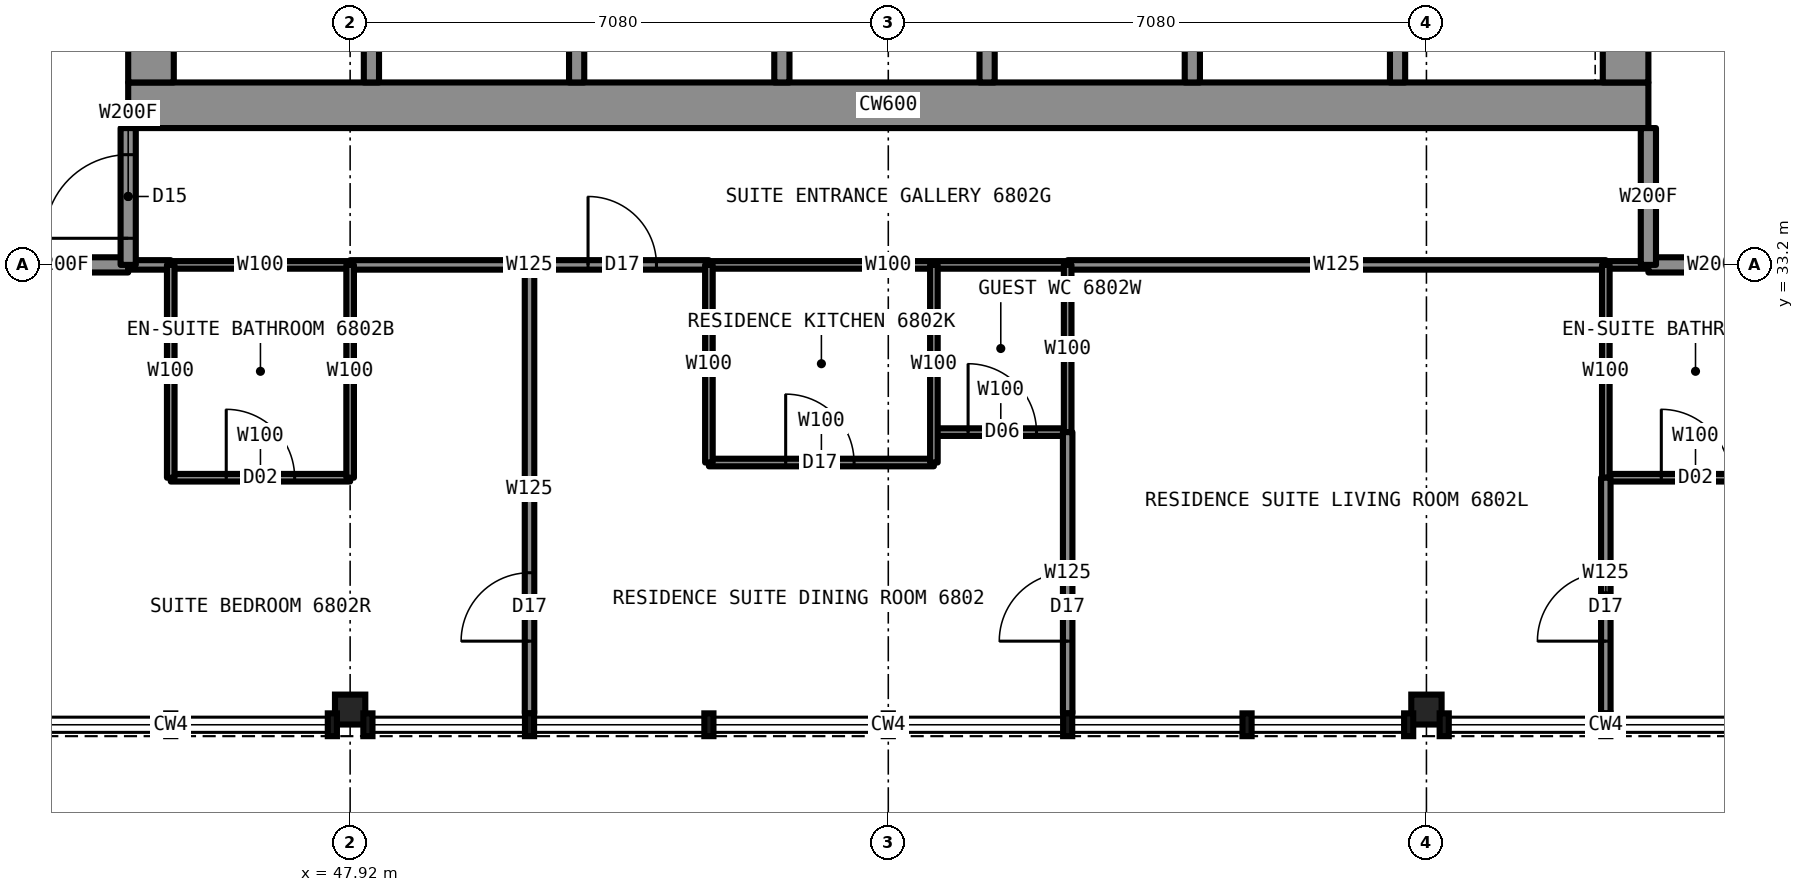
"""IFC4 building model, lengths in metres.
Left out: names, types, materials, properties, quantities, classifications, styles, units other than length and angle.
Written with IfcOpenShell. Run it as: python <this file> out.ifc"""

import sys

from ifc_helpers import new_model, si_unit, direction, frame, frame_2d, origin, origin_2d, place, context, subcontext, project, spatial, rectangle, i_section, extrude, element, fill, save


model = new_model("IFC4")
c1 = context("Model", 3, precision=1e-05, world=origin(), true_north=direction((0.0, 1.0)))
c2 = subcontext(c1, "Body", "Model", "MODEL_VIEW")
j1 = project(units=[si_unit("LENGTHUNIT", "METRE"), si_unit("PLANEANGLEUNIT", "RADIAN")], contexts=[c1])
p1 = place(None, origin())
s1 = spatial("IfcSite", under=j1, at=p1, CompositionType="ELEMENT")
p2 = place(p1, origin())
s2 = spatial("IfcBuilding", under=s1, at=p2, CompositionType="ELEMENT")
p3 = place(p2, frame((0.0, 0.0, 247.7)))
s3 = spatial("IfcBuildingStorey", under=s2, at=p3, CompositionType="ELEMENT", Elevation=247.7)
for number, where, z_axis, x_axis in (
    (1, (47.92, 27.35, 0.0), (0.0, 0.0, 1.0), (1.0, 0.0, 0.0)),
    (2, (62.08, 27.35, 0.0), (0.0, 0.0, 1.0), (1.0, 0.0, 0.0)),
):
    element("IfcColumn", number, at=place(p3, frame(where, z_axis=z_axis, x_axis=x_axis)), inside=s3, PredefinedType="COLUMN", context=c2, shape_type="SweptSolid", body=[
        extrude(i_section(OverallWidth=0.399, OverallDepth=0.394, WebThickness=0.023, FlangeThickness=0.037, at=origin_2d()), origin(), (0.0, 0.0, 1.0), 3.5),
    ])
p4 = place(p3, frame((45.0, 35.3, 0.0), z_axis=(0.0, 0.0, 1.0), x_axis=(1.0, 0.0, 0.0)))
e3 = element("IfcWall", 3, at=p4, inside=s3, PredefinedType="SHEAR", context=c2, shape_type="SweptSolid", body=[
    extrude(rectangle(XDim=20.0, YDim=0.6, at=frame_2d((10.0, 0.0))), origin(), (0.0, 0.0, 1.0), 3.5),
])
p5 = place(p3, frame((64.7, 35.6, 0.0), z_axis=(0.0, 0.0, 1.0), x_axis=(0.0, 1.0, 0.0)))
e4 = element("IfcWall", 4, at=p5, inside=s3, PredefinedType="SHEAR", context=c2, shape_type="SweptSolid", body=[
    extrude(rectangle(XDim=18.8, YDim=0.6, at=frame_2d((9.4, 0.0))), origin(), (0.0, 0.0, 1.0), 3.5),
])
p6 = place(p5, frame((13.4, 0.0, 0.0)))
e5 = element("IfcOpeningElement", 5, at=p6, cuts=e4, PredefinedType="OPENING", context=c2, shape_type="SweptSolid", body=[
    extrude(rectangle(XDim=1.8, YDim=2.2, at=frame_2d((0.9, 1.1))), frame((0.0, 0.31, 0.0), z_axis=(0.0, -1.0, 0.0), x_axis=(1.0, 0.0, 0.0)), (0.0, 0.0, 1.0), 0.62),
])
p7 = place(p5, frame((3.6, 0.0, 0.0)))
e6 = element("IfcOpeningElement", 6, at=p7, cuts=e4, PredefinedType="OPENING", context=c2, shape_type="SweptSolid", body=[
    extrude(rectangle(XDim=1.8, YDim=2.2, at=frame_2d((0.9, 1.1))), frame((0.0, 0.31, 0.0), z_axis=(0.0, -1.0, 0.0), x_axis=(1.0, 0.0, 0.0)), (0.0, 0.0, 1.0), 0.62),
])
p8 = place(p3, frame((45.3, 35.6, 0.0), z_axis=(0.0, 0.0, 1.0), x_axis=(0.0, 1.0, 0.0)))
e7 = element("IfcWall", 7, at=p8, inside=s3, PredefinedType="SHEAR", context=c2, shape_type="SweptSolid", body=[
    extrude(rectangle(XDim=18.8, YDim=0.6, at=frame_2d((9.4, 0.0))), origin(), (0.0, 0.0, 1.0), 3.5),
])
p9 = place(p8, frame((13.4, 0.0, 0.0)))
e8 = element("IfcOpeningElement", 8, at=p9, cuts=e7, PredefinedType="OPENING", context=c2, shape_type="SweptSolid", body=[
    extrude(rectangle(XDim=1.8, YDim=2.2, at=frame_2d((0.9, 1.1))), frame((0.0, 0.31, 0.0), z_axis=(0.0, -1.0, 0.0), x_axis=(1.0, 0.0, 0.0)), (0.0, 0.0, 1.0), 0.62),
])
p10 = place(p8, frame((3.6, 0.0, 0.0)))
e9 = element("IfcOpeningElement", 9, at=p10, cuts=e7, PredefinedType="OPENING", context=c2, shape_type="SweptSolid", body=[
    extrude(rectangle(XDim=1.8, YDim=2.2, at=frame_2d((0.9, 1.1))), frame((0.0, 0.31, 0.0), z_axis=(0.0, -1.0, 0.0), x_axis=(1.0, 0.0, 0.0)), (0.0, 0.0, 1.0), 0.62),
])
p11 = place(p8, frame((6.4, 0.0, 0.0)))
e10 = element("IfcOpeningElement", 10, at=p11, cuts=e7, PredefinedType="OPENING", context=c2, shape_type="SweptSolid", body=[
    extrude(rectangle(XDim=1.2, YDim=2.2, at=frame_2d((0.6, 1.1))), frame((0.0, 0.31, 0.0), z_axis=(0.0, -1.0, 0.0), x_axis=(1.0, 0.0, 0.0)), (0.0, 0.0, 1.0), 0.62),
])
p12 = place(p3, frame((45.56, 33.2, 0.0), z_axis=(0.0, 0.0, 1.0), x_axis=(1.0, 0.0, 0.0)))
e11 = element("IfcWall", 11, at=p12, inside=s3, PredefinedType="PARTITIONING", context=c2, shape_type="SweptSolid", body=[
    extrude(rectangle(XDim=2.36, YDim=0.1, at=frame_2d((1.18, 0.0))), origin(), (0.0, 0.0, 1.0), 3.33),
])
p13 = place(p3, frame((52.64, 33.2, 0.0), z_axis=(0.0, 0.0, 1.0), x_axis=(1.0, 0.0, 0.0)))
e12 = element("IfcWall", 12, at=p13, inside=s3, PredefinedType="PARTITIONING", context=c2, shape_type="SweptSolid", body=[
    extrude(rectangle(XDim=4.72, YDim=0.1, at=frame_2d((2.36, 0.0))), origin(), (0.0, 0.0, 1.0), 3.33),
])
p14 = place(p3, frame((64.44, 33.2, 0.0), z_axis=(0.0, 0.0, 1.0), x_axis=(1.0, 0.0, 0.0)))
e13 = element("IfcWall", 13, at=p14, inside=s3, PredefinedType="PARTITIONING", context=c2, shape_type="SweptSolid", body=[
    extrude(rectangle(XDim=0.56, YDim=0.1, at=frame_2d((0.28, 0.0))), origin(), (0.0, 0.0, 1.0), 3.33),
])
p15 = place(p3, frame((43.2, 33.2, 0.0), z_axis=(0.0, 0.0, 1.0), x_axis=(1.0, 0.0, 0.0)))
e14 = element("IfcWall", 14, at=p15, inside=s3, PredefinedType="PARTITIONING", context=c2, shape_type="SweptSolid", body=[
    extrude(rectangle(XDim=1.8, YDim=0.2, at=frame_2d((0.9, 0.0))), origin(), (0.0, 0.0, 1.0), 3.33),
])
p16 = place(p3, frame((65.0, 33.2, 0.0), z_axis=(0.0, 0.0, 1.0), x_axis=(1.0, 0.0, 0.0)))
e15 = element("IfcWall", 15, at=p16, inside=s3, PredefinedType="PARTITIONING", context=c2, shape_type="SweptSolid", body=[
    extrude(rectangle(XDim=1.78, YDim=0.2, at=frame_2d((0.89, 0.0))), origin(), (0.0, 0.0, 1.0), 3.33),
])
p17 = place(p3, frame((45.0, 33.2, 0.0), z_axis=(0.0, 0.0, 1.0), x_axis=(1.0, 0.0, 0.0)))
e16 = element("IfcWall", 16, at=p17, inside=s3, PredefinedType="PARTITIONING", context=c2, shape_type="SweptSolid", body=[
    extrude(rectangle(XDim=0.56, YDim=0.125, at=frame_2d((0.28, 0.0))), origin(), (0.0, 0.0, 1.0), 3.33),
])
p18 = place(p3, frame((47.92, 33.2, 0.0), z_axis=(0.0, 0.0, 1.0), x_axis=(1.0, 0.0, 0.0)))
e17 = element("IfcWall", 17, at=p18, inside=s3, PredefinedType="PARTITIONING", context=c2, shape_type="SweptSolid", body=[
    extrude(rectangle(XDim=4.72, YDim=0.125, at=frame_2d((2.36, 0.0))), origin(), (0.0, 0.0, 1.0), 3.33),
])
p19 = place(p18, frame((3.13, 0.0, 0.0)))
e18 = element("IfcOpeningElement", 18, at=p19, cuts=e17, PredefinedType="OPENING", context=c2, shape_type="SweptSolid", body=[
    extrude(rectangle(XDim=0.9, YDim=2.2, at=frame_2d((0.45, 1.1))), frame((0.0, 0.073, 0.0), z_axis=(0.0, -1.0, 0.0), x_axis=(1.0, 0.0, 0.0)), (0.0, 0.0, 1.0), 0.145),
])
p20 = place(p3, frame((57.36, 33.2, 0.0), z_axis=(0.0, 0.0, 1.0), x_axis=(1.0, 0.0, 0.0)))
e19 = element("IfcWall", 19, at=p20, inside=s3, PredefinedType="PARTITIONING", context=c2, shape_type="SweptSolid", body=[
    extrude(rectangle(XDim=7.08, YDim=0.125, at=frame_2d((3.54, 0.0))), origin(), (0.0, 0.0, 1.0), 3.33),
])
p21 = place(p3, frame((55.6, 31.0, 0.0), z_axis=(0.0, 0.0, 1.0), x_axis=(1.0, 0.0, 0.0)))
e20 = element("IfcWall", 20, at=p21, inside=s3, PredefinedType="PARTITIONING", context=c2, shape_type="SweptSolid", body=[
    extrude(rectangle(XDim=1.76, YDim=0.1, at=frame_2d((0.88, 0.0))), origin(), (0.0, 0.0, 1.0), 3.33),
])
p22 = place(p21, frame((0.45, 0.0, 0.0)))
e21 = element("IfcOpeningElement", 21, at=p22, cuts=e20, PredefinedType="OPENING", context=c2, shape_type="SweptSolid", body=[
    extrude(rectangle(XDim=0.9, YDim=2.1, at=frame_2d((0.45, 1.05))), frame((0.0, 0.06, 0.0), z_axis=(0.0, -1.0, 0.0), x_axis=(1.0, 0.0, 0.0)), (0.0, 0.0, 1.0), 0.12),
])
p23 = place(p3, frame((52.64, 30.6, 0.0), z_axis=(0.0, 0.0, 1.0), x_axis=(1.0, 0.0, 0.0)))
e22 = element("IfcWall", 22, at=p23, inside=s3, PredefinedType="PARTITIONING", context=c2, shape_type="SweptSolid", body=[
    extrude(rectangle(XDim=2.96, YDim=0.1, at=frame_2d((1.48, 0.0))), origin(), (0.0, 0.0, 1.0), 3.33),
])
p24 = place(p23, frame((1.01, 0.0, 0.0)))
e23 = element("IfcOpeningElement", 23, at=p24, cuts=e22, PredefinedType="OPENING", context=c2, shape_type="SweptSolid", body=[
    extrude(rectangle(XDim=0.9, YDim=2.2, at=frame_2d((0.45, 1.1))), frame((0.0, 0.06, 0.0), z_axis=(0.0, -1.0, 0.0), x_axis=(1.0, 0.0, 0.0)), (0.0, 0.0, 1.0), 0.12),
])
p25 = place(p3, frame((45.56, 30.4, 0.0), z_axis=(0.0, 0.0, 1.0), x_axis=(1.0, 0.0, 0.0)))
e24 = element("IfcWall", 24, at=p25, inside=s3, PredefinedType="PARTITIONING", context=c2, shape_type="SweptSolid", body=[
    extrude(rectangle(XDim=2.36, YDim=0.1, at=frame_2d((1.18, 0.0))), origin(), (0.0, 0.0, 1.0), 3.33),
])
p26 = place(p25, frame((0.73, 0.0, 0.0)))
e25 = element("IfcOpeningElement", 25, at=p26, cuts=e24, PredefinedType="OPENING", context=c2, shape_type="SweptSolid", body=[
    extrude(rectangle(XDim=0.9, YDim=2.1, at=frame_2d((0.45, 1.05))), frame((0.0, 0.06, 0.0), z_axis=(0.0, -1.0, 0.0), x_axis=(1.0, 0.0, 0.0)), (0.0, 0.0, 1.0), 0.12),
])
p27 = place(p3, frame((64.44, 30.4, 0.0), z_axis=(0.0, 0.0, 1.0), x_axis=(1.0, 0.0, 0.0)))
e26 = element("IfcWall", 26, at=p27, inside=s3, PredefinedType="PARTITIONING", context=c2, shape_type="SweptSolid", body=[
    extrude(rectangle(XDim=2.36, YDim=0.1, at=frame_2d((1.18, 0.0))), origin(), (0.0, 0.0, 1.0), 3.33),
])
p28 = place(p27, frame((0.73, 0.0, 0.0)))
e27 = element("IfcOpeningElement", 27, at=p28, cuts=e26, PredefinedType="OPENING", context=c2, shape_type="SweptSolid", body=[
    extrude(rectangle(XDim=0.9, YDim=2.1, at=frame_2d((0.45, 1.05))), frame((0.0, 0.06, 0.0), z_axis=(0.0, -1.0, 0.0), x_axis=(1.0, 0.0, 0.0)), (0.0, 0.0, 1.0), 0.12),
])
p29 = place(p3, frame((45.0, 33.2, 0.0), z_axis=(0.0, 0.0, 1.0), x_axis=(0.0, 1.0, 0.0)))
e28 = element("IfcWall", 28, at=p29, inside=s3, PredefinedType="PARTITIONING", context=c2, shape_type="SweptSolid", body=[
    extrude(rectangle(XDim=1.8, YDim=0.2, at=frame_2d((0.9, 0.0))), origin(), (0.0, 0.0, 1.0), 3.33),
])
p30 = place(p29, frame((0.35, 0.0, 0.0)))
e29 = element("IfcOpeningElement", 29, at=p30, cuts=e28, PredefinedType="OPENING", context=c2, shape_type="SweptSolid", body=[
    extrude(rectangle(XDim=1.1, YDim=2.2, at=frame_2d((0.55, 1.1))), frame((0.0, 0.11, 0.0), z_axis=(0.0, -1.0, 0.0), x_axis=(1.0, 0.0, 0.0)), (0.0, 0.0, 1.0), 0.22),
])
p31 = place(p3, frame((52.64, 30.6, 0.0), z_axis=(0.0, 0.0, 1.0), x_axis=(0.0, 1.0, 0.0)))
e30 = element("IfcWall", 30, at=p31, inside=s3, PredefinedType="PARTITIONING", context=c2, shape_type="SweptSolid", body=[
    extrude(rectangle(XDim=2.6, YDim=0.1, at=frame_2d((1.3, 0.0))), origin(), (0.0, 0.0, 1.0), 3.33),
])
p32 = place(p3, frame((50.28, 27.3, 0.0), z_axis=(0.0, 0.0, 1.0), x_axis=(0.0, 1.0, 0.0)))
e31 = element("IfcWall", 31, at=p32, inside=s3, PredefinedType="PARTITIONING", context=c2, shape_type="SweptSolid", body=[
    extrude(rectangle(XDim=5.9, YDim=0.125, at=frame_2d((2.95, 0.0))), origin(), (0.0, 0.0, 1.0), 3.33),
])
p33 = place(p32, frame((0.95, 0.0, 0.0)))
e32 = element("IfcOpeningElement", 32, at=p33, cuts=e31, PredefinedType="OPENING", context=c2, shape_type="SweptSolid", body=[
    extrude(rectangle(XDim=0.9, YDim=2.2, at=frame_2d((0.45, 1.1))), frame((0.0, 0.073, 0.0), z_axis=(0.0, -1.0, 0.0), x_axis=(1.0, 0.0, 0.0)), (0.0, 0.0, 1.0), 0.145),
])
p34 = place(p3, frame((47.92, 30.4, 0.0), z_axis=(0.0, 0.0, 1.0), x_axis=(0.0, 1.0, 0.0)))
e33 = element("IfcWall", 33, at=p34, inside=s3, PredefinedType="PARTITIONING", context=c2, shape_type="SweptSolid", body=[
    extrude(rectangle(XDim=2.8, YDim=0.1, at=frame_2d((1.4, 0.0))), origin(), (0.0, 0.0, 1.0), 2.573),
])
p35 = place(p3, frame((45.56, 30.4, 0.0), z_axis=(0.0, 0.0, 1.0), x_axis=(0.0, 1.0, 0.0)))
e34 = element("IfcWall", 34, at=p35, inside=s3, PredefinedType="PARTITIONING", context=c2, shape_type="SweptSolid", body=[
    extrude(rectangle(XDim=2.8, YDim=0.1, at=frame_2d((1.4, 0.0))), origin(), (0.0, 0.0, 1.0), 3.33),
])
p36 = place(p3, frame((55.6, 30.6, 0.0), z_axis=(0.0, 0.0, 1.0), x_axis=(0.0, 1.0, 0.0)))
e35 = element("IfcWall", 35, at=p36, inside=s3, PredefinedType="PARTITIONING", context=c2, shape_type="SweptSolid", body=[
    extrude(rectangle(XDim=2.6, YDim=0.1, at=frame_2d((1.3, 0.0))), origin(), (0.0, 0.0, 1.0), 3.33),
])
p37 = place(p3, frame((65.0, 33.2, 0.0), z_axis=(0.0, 0.0, 1.0), x_axis=(0.0, 1.0, 0.0)))
e36 = element("IfcWall", 36, at=p37, inside=s3, PredefinedType="PARTITIONING", context=c2, shape_type="SweptSolid", body=[
    extrude(rectangle(XDim=1.8, YDim=0.2, at=frame_2d((0.9, 0.0))), origin(), (0.0, 0.0, 1.0), 3.33),
])
p38 = place(p3, frame((57.36, 31.0, 0.0), z_axis=(0.0, 0.0, 1.0), x_axis=(0.0, 1.0, 0.0)))
e37 = element("IfcWall", 37, at=p38, inside=s3, PredefinedType="PARTITIONING", context=c2, shape_type="SweptSolid", body=[
    extrude(rectangle(XDim=2.2, YDim=0.1, at=frame_2d((1.1, 0.0))), origin(), (0.0, 0.0, 1.0), 3.33),
])
p39 = place(p3, frame((57.36, 27.3, 0.0), z_axis=(0.0, 0.0, 1.0), x_axis=(0.0, 1.0, 0.0)))
e38 = element("IfcWall", 38, at=p39, inside=s3, PredefinedType="PARTITIONING", context=c2, shape_type="SweptSolid", body=[
    extrude(rectangle(XDim=3.7, YDim=0.125, at=frame_2d((1.85, 0.0))), origin(), (0.0, 0.0, 1.0), 3.33),
])
p40 = place(p39, frame((0.95, 0.0, 0.0)))
e39 = element("IfcOpeningElement", 39, at=p40, cuts=e38, PredefinedType="OPENING", context=c2, shape_type="SweptSolid", body=[
    extrude(rectangle(XDim=0.9, YDim=2.2, at=frame_2d((0.45, 1.1))), frame((0.0, 0.073, 0.0), z_axis=(0.0, -1.0, 0.0), x_axis=(1.0, 0.0, 0.0)), (0.0, 0.0, 1.0), 0.145),
])
p41 = place(p3, frame((64.44, 30.4, 0.0), z_axis=(0.0, 0.0, 1.0), x_axis=(0.0, 1.0, 0.0)))
e40 = element("IfcWall", 40, at=p41, inside=s3, PredefinedType="PARTITIONING", context=c2, shape_type="SweptSolid", body=[
    extrude(rectangle(XDim=2.8, YDim=0.1, at=frame_2d((1.4, 0.0))), origin(), (0.0, 0.0, 1.0), 3.33),
])
p42 = place(p3, frame((64.44, 27.3, 0.0), z_axis=(0.0, 0.0, 1.0), x_axis=(0.0, 1.0, 0.0)))
e41 = element("IfcWall", 41, at=p42, inside=s3, PredefinedType="PARTITIONING", context=c2, shape_type="SweptSolid", body=[
    extrude(rectangle(XDim=3.1, YDim=0.125, at=frame_2d((1.55, 0.0))), origin(), (0.0, 0.0, 1.0), 3.33),
])
p43 = place(p42, frame((0.95, 0.0, 0.0)))
e42 = element("IfcOpeningElement", 42, at=p43, cuts=e41, PredefinedType="OPENING", context=c2, shape_type="SweptSolid", body=[
    extrude(rectangle(XDim=0.9, YDim=2.2, at=frame_2d((0.45, 1.1))), frame((0.0, 0.073, 0.0), z_axis=(0.0, -1.0, 0.0), x_axis=(1.0, 0.0, 0.0)), (0.0, 0.0, 1.0), 0.145),
])
for number, where, z_axis, x_axis in (
    (43, (48.2, 35.6, 0.0), (0.0, 0.0, 1.0), (0.0, 1.0, 0.0)),
    (44, (50.9, 35.6, 0.0), (0.0, 0.0, 1.0), (0.0, 1.0, 0.0)),
    (45, (53.6, 35.6, 0.0), (0.0, 0.0, 1.0), (0.0, 1.0, 0.0)),
    (46, (56.3, 35.6, 0.0), (0.0, 0.0, 1.0), (0.0, 1.0, 0.0)),
    (47, (59.0, 35.6, 0.0), (0.0, 0.0, 1.0), (0.0, 1.0, 0.0)),
    (48, (61.7, 35.6, 0.0), (0.0, 0.0, 1.0), (0.0, 1.0, 0.0)),
):
    element("IfcWall", number, at=place(p3, frame(where, z_axis=z_axis, x_axis=x_axis)), inside=s3, PredefinedType="PARTITIONING", context=c2, shape_type="SweptSolid", body=[
        extrude(rectangle(XDim=2.7, YDim=0.2, at=frame_2d((1.35, 0.0))), origin(), (0.0, 0.0, 1.0), 3.33),
    ])
p44 = place(p19, origin())
e49 = element("IfcDoor", 49, at=p44, inside=s3, OperationType="SINGLE_SWING_LEFT", PredefinedType="DOOR", context=c2, shape_type="SweptSolid", body=[
    extrude(rectangle(XDim=0.9, YDim=2.2, at=frame_2d((0.45, 1.1))), frame((0.0, 0.025, 0.0), z_axis=(0.0, -1.0, 0.0), x_axis=(1.0, 0.0, 0.0)), (0.0, 0.0, 1.0), 0.05),
])
fill(e18, e49)
p45 = place(p26, origin())
e50 = element("IfcDoor", 50, at=p45, inside=s3, OperationType="SINGLE_SWING_RIGHT", PredefinedType="DOOR", context=c2, shape_type="SweptSolid", body=[
    extrude(rectangle(XDim=0.9, YDim=2.1, at=frame_2d((0.45, 1.05))), frame((0.0, 0.025, 0.0), z_axis=(0.0, -1.0, 0.0), x_axis=(1.0, 0.0, 0.0)), (0.0, 0.0, 1.0), 0.05),
])
fill(e25, e50)
p46 = place(p28, origin())
e51 = element("IfcDoor", 51, at=p46, inside=s3, OperationType="SINGLE_SWING_RIGHT", PredefinedType="DOOR", context=c2, shape_type="SweptSolid", body=[
    extrude(rectangle(XDim=0.9, YDim=2.1, at=frame_2d((0.45, 1.05))), frame((0.0, 0.025, 0.0), z_axis=(0.0, -1.0, 0.0), x_axis=(1.0, 0.0, 0.0)), (0.0, 0.0, 1.0), 0.05),
])
fill(e27, e51)
p47 = place(p30, origin())
e52 = element("IfcDoor", 52, at=p47, inside=s3, OperationType="SINGLE_SWING_LEFT", PredefinedType="DOOR", context=c2, shape_type="SweptSolid", body=[
    extrude(rectangle(XDim=1.1, YDim=2.2, at=frame_2d((0.55, 1.1))), frame((0.0, 0.025, 0.0), z_axis=(0.0, -1.0, 0.0), x_axis=(1.0, 0.0, 0.0)), (0.0, 0.0, 1.0), 0.05),
])
fill(e29, e52)
p48 = place(p24, origin())
e53 = element("IfcDoor", 53, at=p48, inside=s3, OperationType="SINGLE_SWING_LEFT", PredefinedType="DOOR", context=c2, shape_type="SweptSolid", body=[
    extrude(rectangle(XDim=0.9, YDim=2.2, at=frame_2d((0.45, 1.1))), frame((0.0, 0.025, 0.0), z_axis=(0.0, -1.0, 0.0), x_axis=(1.0, 0.0, 0.0)), (0.0, 0.0, 1.0), 0.05),
])
fill(e23, e53)
p49 = place(p40, origin())
e54 = element("IfcDoor", 54, at=p49, inside=s3, OperationType="SINGLE_SWING_LEFT", PredefinedType="DOOR", context=c2, shape_type="SweptSolid", body=[
    extrude(rectangle(XDim=0.9, YDim=2.2, at=frame_2d((0.45, 1.1))), frame((0.0, 0.025, 0.0), z_axis=(0.0, -1.0, 0.0), x_axis=(1.0, 0.0, 0.0)), (0.0, 0.0, 1.0), 0.05),
])
fill(e39, e54)
p50 = place(p33, origin())
e55 = element("IfcDoor", 55, at=p50, inside=s3, OperationType="SINGLE_SWING_LEFT", PredefinedType="DOOR", context=c2, shape_type="SweptSolid", body=[
    extrude(rectangle(XDim=0.9, YDim=2.2, at=frame_2d((0.45, 1.1))), frame((0.0, 0.025, 0.0), z_axis=(0.0, -1.0, 0.0), x_axis=(1.0, 0.0, 0.0)), (0.0, 0.0, 1.0), 0.05),
])
fill(e32, e55)
p51 = place(p43, origin())
e56 = element("IfcDoor", 56, at=p51, inside=s3, OperationType="SINGLE_SWING_LEFT", PredefinedType="DOOR", context=c2, shape_type="SweptSolid", body=[
    extrude(rectangle(XDim=0.9, YDim=2.2, at=frame_2d((0.45, 1.1))), frame((0.0, 0.025, 0.0), z_axis=(0.0, -1.0, 0.0), x_axis=(1.0, 0.0, 0.0)), (0.0, 0.0, 1.0), 0.05),
])
fill(e42, e56)
p52 = place(p22, origin())
e57 = element("IfcDoor", 57, at=p52, inside=s3, OperationType="SINGLE_SWING_LEFT", PredefinedType="DOOR", context=c2, shape_type="SweptSolid", body=[
    extrude(rectangle(XDim=0.9, YDim=2.1, at=frame_2d((0.45, 1.05))), frame((0.0, 0.025, 0.0), z_axis=(0.0, -1.0, 0.0), x_axis=(1.0, 0.0, 0.0)), (0.0, 0.0, 1.0), 0.05),
])
fill(e21, e57)
save(model, sys.argv[1])
